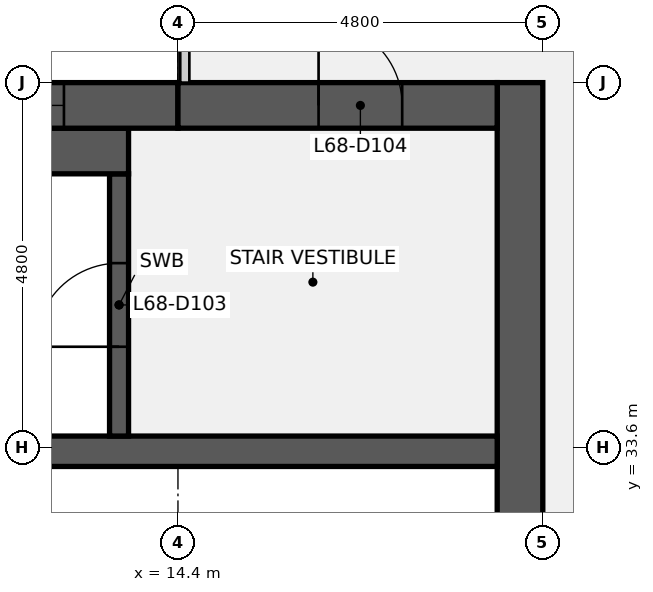
"""IFC4 building model, lengths in metres.
Left out: names, types, materials, properties, quantities, classifications, styles, units other than length and angle.
Written with IfcOpenShell. Run it as: python <this file> out.ifc"""

import sys

from ifc_helpers import new_model, si_unit, direction, frame, frame_2d, origin, place, context, subcontext, project, spatial, rectangle, extrude, element, fill, save


model = new_model("IFC4")
c1 = context("Model", 3, precision=1e-05, world=origin(), true_north=direction((0.0, 1.0)))
c2 = subcontext(c1, "Body", "Model", "MODEL_VIEW")
j1 = project(units=[si_unit("LENGTHUNIT", "METRE"), si_unit("PLANEANGLEUNIT", "RADIAN")], contexts=[c1])
p1 = place(None, origin())
s1 = spatial("IfcSite", under=j1, at=p1, CompositionType="ELEMENT")
p2 = place(p1, origin())
s2 = spatial("IfcBuilding", under=s1, at=p2, CompositionType="ELEMENT")
p3 = place(p2, frame((0.0, 0.0, 310.3)))
s3 = spatial("IfcBuildingStorey", under=s2, at=p3, CompositionType="ELEMENT", Elevation=310.3)
p4 = place(p3, frame((18.9, 38.4, 0.0), z_axis=(0.0, 0.0, 1.0), x_axis=(0.0, -1.0, 0.0)))
e1 = element("IfcWall", 1, at=p4, inside=s3, PredefinedType="SHEAR", context=c2, shape_type="SweptSolid", body=[
    extrude(rectangle(XDim=28.8, YDim=0.6, at=frame_2d((14.4, 0.0))), origin(), (0.0, 0.0, 1.0), 3.84),
])
p5 = place(p4, frame((18.3, 0.0, 0.0)))
e2 = element("IfcOpeningElement", 2, at=p5, cuts=e1, PredefinedType="OPENING", context=c2, shape_type="SweptSolid", body=[
    extrude(rectangle(XDim=1.8, YDim=2.1, at=frame_2d((0.9, 1.05))), frame((0.0, 0.31, 0.0), z_axis=(0.0, -1.0, 0.0), x_axis=(1.0, 0.0, 0.0)), (0.0, 0.0, 1.0), 0.62),
])
p6 = place(p4, frame((8.7, 0.0, 0.0)))
e3 = element("IfcOpeningElement", 3, at=p6, cuts=e1, PredefinedType="OPENING", context=c2, shape_type="SweptSolid", body=[
    extrude(rectangle(XDim=1.8, YDim=2.1, at=frame_2d((0.9, 1.05))), frame((0.0, 0.31, 0.0), z_axis=(0.0, -1.0, 0.0), x_axis=(1.0, 0.0, 0.0)), (0.0, 0.0, 1.0), 0.62),
])
p7 = place(p3, frame((0.6, 33.55, 0.0), z_axis=(0.0, 0.0, 1.0), x_axis=(1.0, 0.0, 0.0)))
e4 = element("IfcWall", 4, at=p7, inside=s3, PredefinedType="SHEAR", context=c2, shape_type="SweptSolid", body=[
    extrude(rectangle(XDim=18.0, YDim=0.4, at=frame_2d((9.0, 0.0))), origin(), (0.0, 0.0, 1.0), 3.84),
])
p8 = place(p3, frame((13.625, 33.75, 0.0), z_axis=(0.0, 0.0, 1.0), x_axis=(0.0, 1.0, 0.0)))
e5 = element("IfcWall", 5, at=p8, inside=s3, PredefinedType="SHEAR", context=c2, shape_type="SweptSolid", body=[
    extrude(rectangle(XDim=3.45, YDim=0.25, at=frame_2d((1.725, 0.0))), origin(), (0.0, 0.0, 1.0), 3.84),
])
p9 = place(p8, frame((1.175, 0.0, 0.0)))
e6 = element("IfcOpeningElement", 6, at=p9, cuts=e5, PredefinedType="OPENING", context=c2, shape_type="SweptSolid", body=[
    extrude(rectangle(XDim=1.1, YDim=2.1, at=frame_2d((0.55, 1.05))), frame((0.0, 0.135, 0.0), z_axis=(0.0, -1.0, 0.0), x_axis=(1.0, 0.0, 0.0)), (0.0, 0.0, 1.0), 0.27),
])
p10 = place(p3, frame((6.25, 37.5, 0.0), z_axis=(0.0, 0.0, 1.0), x_axis=(1.0, 0.0, 0.0)))
e7 = element("IfcWall", 7, at=p10, inside=s3, PredefinedType="SHEAR", context=c2, shape_type="SweptSolid", body=[
    extrude(rectangle(XDim=7.5, YDim=0.6, at=frame_2d((3.75, 0.0))), origin(), (0.0, 0.0, 1.0), 3.84),
])
p11 = place(p3, frame((0.6, 38.1, 0.0), z_axis=(0.0, 0.0, 1.0), x_axis=(1.0, 0.0, 0.0)))
e8 = element("IfcWall", 8, at=p11, inside=s3, PredefinedType="SHEAR", context=c2, shape_type="SweptSolid", body=[
    extrude(rectangle(XDim=13.8, YDim=0.6, at=frame_2d((6.9, 0.0))), origin(), (0.0, 0.0, 1.0), 3.84),
])
p12 = place(p11, frame((5.7, 0.0, 0.9)))
e9 = element("IfcOpeningElement", 9, at=p12, cuts=e8, PredefinedType="OPENING", context=c2, shape_type="SweptSolid", body=[
    extrude(rectangle(XDim=1.8, YDim=1.5, at=frame_2d((0.9, 0.75))), frame((0.0, 0.31, 0.0), z_axis=(0.0, -1.0, 0.0), x_axis=(1.0, 0.0, 0.0)), (0.0, 0.0, 1.0), 0.62),
])
p13 = place(p11, frame((10.5, 0.0, 0.9)))
e10 = element("IfcOpeningElement", 10, at=p13, cuts=e8, PredefinedType="OPENING", context=c2, shape_type="SweptSolid", body=[
    extrude(rectangle(XDim=1.8, YDim=1.5, at=frame_2d((0.9, 0.75))), frame((0.0, 0.31, 0.0), z_axis=(0.0, -1.0, 0.0), x_axis=(1.0, 0.0, 0.0)), (0.0, 0.0, 1.0), 0.62),
])
p14 = place(p3, frame((14.4, 38.1, 0.0), z_axis=(0.0, 0.0, 1.0), x_axis=(1.0, 0.0, 0.0)))
e11 = element("IfcWall", 11, at=p14, inside=s3, PredefinedType="SHEAR", context=c2, shape_type="SweptSolid", body=[
    extrude(rectangle(XDim=4.2, YDim=0.6, at=frame_2d((2.1, 0.0))), origin(), (0.0, 0.0, 1.0), 3.84),
])
p15 = place(p14, frame((1.85, 0.0, 0.0)))
e12 = element("IfcOpeningElement", 12, at=p15, cuts=e11, PredefinedType="OPENING", context=c2, shape_type="SweptSolid", body=[
    extrude(rectangle(XDim=1.1, YDim=2.1, at=frame_2d((0.55, 1.05))), frame((0.0, 0.31, 0.0), z_axis=(0.0, -1.0, 0.0), x_axis=(1.0, 0.0, 0.0)), (0.0, 0.0, 1.0), 0.62),
])
p16 = place(p9, origin())
e13 = element("IfcDoor", 13, at=p16, inside=s3, OperationType="SINGLE_SWING_LEFT", PredefinedType="DOOR", context=c2, shape_type="SweptSolid", body=[
    extrude(rectangle(XDim=1.1, YDim=2.1, at=frame_2d((0.55, 1.05))), frame((0.0, 0.025, 0.0), z_axis=(0.0, -1.0, 0.0), x_axis=(1.0, 0.0, 0.0)), (0.0, 0.0, 1.0), 0.05),
])
fill(e6, e13)
p17 = place(p15, origin())
e14 = element("IfcDoor", 14, at=p17, inside=s3, OperationType="SINGLE_SWING_LEFT", PredefinedType="DOOR", context=c2, shape_type="SweptSolid", body=[
    extrude(rectangle(XDim=1.1, YDim=2.1, at=frame_2d((0.55, 1.05))), frame((0.0, 0.025, 0.0), z_axis=(0.0, -1.0, 0.0), x_axis=(1.0, 0.0, 0.0)), (0.0, 0.0, 1.0), 0.05),
])
fill(e12, e14)
p18 = place(p13, origin())
e15 = element("IfcWindow", 15, at=p18, inside=s3, PartitioningType="SINGLE_PANEL", PredefinedType="WINDOW", context=c2, shape_type="SweptSolid", body=[
    extrude(rectangle(XDim=1.8, YDim=1.5, at=frame_2d((0.9, 0.75))), frame((0.0, 0.03, 0.0), z_axis=(0.0, -1.0, 0.0), x_axis=(1.0, 0.0, 0.0)), (0.0, 0.0, 1.0), 0.06),
])
fill(e10, e15)
save(model, sys.argv[1])
